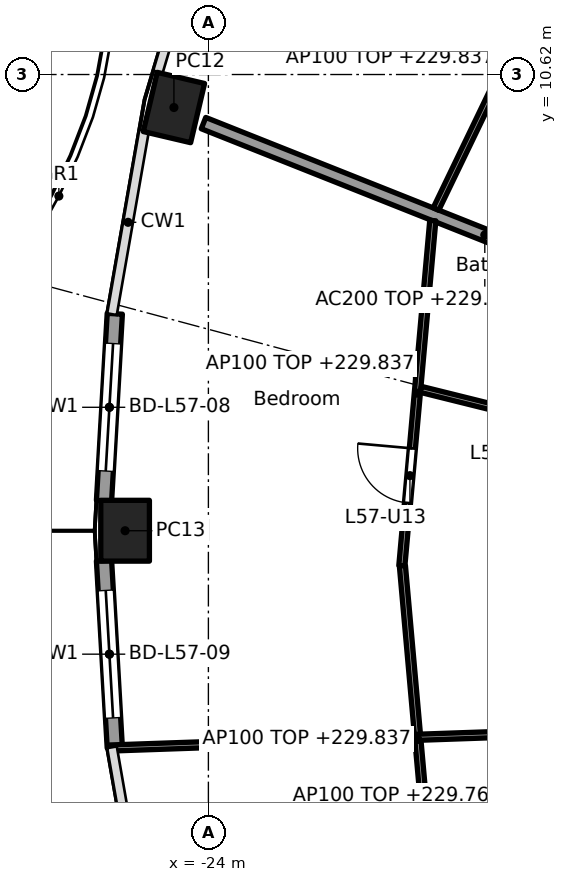
"""IFC4 building model, lengths in metres.
Left out: names, types, materials, properties, quantities, classifications, styles, units other than length and angle.
Written with IfcOpenShell. Run it as: python <this file> out.ifc"""

import sys

from ifc_helpers import new_model, si_unit, direction, frame, frame_2d, origin, origin_2d, place, context, subcontext, project, spatial, rectangle, hollow_rectangle, extrude, element, fill, save


model = new_model("IFC4")
c1 = context("Model", 3, precision=1e-05, world=origin(), true_north=direction((0.0, 1.0)))
c2 = subcontext(c1, "Body", "Model", "MODEL_VIEW")
j1 = project(units=[si_unit("LENGTHUNIT", "METRE"), si_unit("PLANEANGLEUNIT", "RADIAN")], contexts=[c1])
p1 = place(None, origin())
s1 = spatial("IfcSite", under=j1, at=p1, CompositionType="ELEMENT")
p2 = place(p1, origin())
s2 = spatial("IfcBuilding", under=s1, at=p2, CompositionType="ELEMENT")
p3 = place(p2, frame((0.0, 0.0, 227.0)))
s3 = spatial("IfcBuildingStorey", under=s2, at=p3, CompositionType="ELEMENT", Elevation=227.0)
for number, where, z_axis, x_axis in (
    (1, (-24.567, 10.077, 0.0), (0.0, 0.0, 1.0), (-0.229, -0.973, 0.0)),
    (2, (-25.37, 3.118, 0.0), (0.0, 0.0, 1.0), (0.0, -1.0, 0.0)),
):
    element("IfcColumn", number, at=place(p3, frame(where, z_axis=z_axis, x_axis=x_axis)), inside=s3, PredefinedType="COLUMN", context=c2, shape_type="SweptSolid", body=[
        extrude(hollow_rectangle(XDim=1.0, YDim=0.8, WallThickness=0.032, at=origin_2d()), origin(), (0.0, 0.0, 1.0), 3.7),
    ])
p4 = place(p3, frame((-25.717, 3.61, 0.0), z_axis=(0.0, 0.0, 1.0), x_axis=(0.057528189427, 0.998343882348, 0.0)))
e3 = element("IfcWall", 3, at=p4, inside=s3, PredefinedType="SOLIDWALL", context=c2, shape_type="SweptSolid", body=[
    extrude(rectangle(XDim=3.081, YDim=0.25, at=frame_2d((1.541, 0.0))), origin(), (0.0, 0.0, 1.0), 3.44),
])
p5 = place(p4, frame((0.49, 0.0, 0.0)))
e4 = element("IfcOpeningElement", 4, at=p5, cuts=e3, PredefinedType="OPENING", context=c2, shape_type="SweptSolid", body=[
    extrude(rectangle(XDim=2.1, YDim=2.4, at=frame_2d((1.05, 1.2))), frame((0.0, 0.135, 0.0), z_axis=(0.0, -1.0, 0.0), x_axis=(1.0, 0.0, 0.0)), (0.0, 0.0, 1.0), 0.27),
])
p6 = place(p3, frame((-25.539, -0.45, 0.0), z_axis=(0.0, 0.0, 1.0), x_axis=(-0.057528189427, 0.998343882348, 0.0)))
e5 = element("IfcWall", 5, at=p6, inside=s3, PredefinedType="SOLIDWALL", context=c2, shape_type="SweptSolid", body=[
    extrude(rectangle(XDim=3.081, YDim=0.25, at=frame_2d((1.541, 0.0))), origin(), (0.0, 0.0, 1.0), 3.44),
])
p7 = place(p6, frame((0.49, 0.0, 0.0)))
e6 = element("IfcOpeningElement", 6, at=p7, cuts=e5, PredefinedType="OPENING", context=c2, shape_type="SweptSolid", body=[
    extrude(rectangle(XDim=2.1, YDim=2.4, at=frame_2d((1.05, 1.2))), frame((0.0, 0.135, 0.0), z_axis=(0.0, -1.0, 0.0), x_axis=(1.0, 0.0, 0.0)), (0.0, 0.0, 1.0), 0.27),
])
p8 = place(p3, frame((-14.829, 6.141, 0.0), z_axis=(0.0, 0.0, 1.0), x_axis=(-0.929202069098, 0.36957206981, 0.0)))
e7 = element("IfcWall", 7, at=p8, inside=s3, PredefinedType="PARTITIONING", context=c2, shape_type="SweptSolid", body=[
    extrude(rectangle(XDim=9.957, YDim=0.2, at=frame_2d((4.978, 0.0))), origin(), (0.0, 0.0, 1.0), 2.837),
])
p9 = place(p3, frame((-17.861, 13.379, 0.0), z_axis=(0.0, 0.0, 1.0), x_axis=(-0.434302390612, -0.900767136117, 0.0)))
e8 = element("IfcWall", 8, at=p9, inside=s3, PredefinedType="PARTITIONING", context=c2, shape_type="SweptSolid", body=[
    extrude(rectangle(XDim=5.519, YDim=0.1, at=frame_2d((2.759, 0.0))), origin(), (0.0, 0.0, 1.0), 2.837),
])
p10 = place(p9, frame((0.992, 0.0, 0.0)))
e9 = element("IfcOpeningElement", 9, at=p10, cuts=e8, PredefinedType="OPENING", context=c2, shape_type="SweptSolid", body=[
    extrude(rectangle(XDim=0.9, YDim=2.1, at=frame_2d((0.45, 1.05))), frame((0.0, 0.06, 0.0), z_axis=(0.0, -1.0, 0.0), x_axis=(1.0, 0.0, 0.0)), (0.0, 0.0, 1.0), 0.12),
])
p11 = place(p3, frame((-20.31, 8.218, 0.0), z_axis=(0.0, 0.0, 1.0), x_axis=(-0.089284106956, -0.996006198899, 0.0)))
e10 = element("IfcWall", 10, at=p11, inside=s3, PredefinedType="PARTITIONING", context=c2, shape_type="SweptSolid", body=[
    extrude(rectangle(XDim=5.698, YDim=0.1, at=frame_2d((2.849, 0.0))), origin(), (0.0, 0.0, 1.0), 2.837),
])
p12 = place(p11, frame((3.761, 0.0, 0.0)))
e11 = element("IfcOpeningElement", 11, at=p12, cuts=e10, PredefinedType="OPENING", context=c2, shape_type="SweptSolid", body=[
    extrude(rectangle(XDim=0.9, YDim=2.1, at=frame_2d((0.45, 1.05))), frame((0.0, 0.06, 0.0), z_axis=(0.0, -1.0, 0.0), x_axis=(1.0, 0.0, 0.0)), (0.0, 0.0, 1.0), 0.12),
])
p13 = place(p3, frame((-12.662, 3.494, 0.0), z_axis=(0.0, 0.0, 1.0), x_axis=(-0.970505526029, 0.241078874951, 0.0)))
e12 = element("IfcWall", 12, at=p13, inside=s3, PredefinedType="PARTITIONING", context=c2, shape_type="SweptSolid", body=[
    extrude(rectangle(XDim=8.085, YDim=0.1, at=frame_2d((4.043, 0.0))), origin(), (0.0, 0.0, 1.0), 2.762),
])
p14 = place(p13, frame((0.464, 0.0, 0.0)))
e13 = element("IfcOpeningElement", 13, at=p14, cuts=e12, PredefinedType="OPENING", context=c2, shape_type="SweptSolid", body=[
    extrude(rectangle(XDim=0.9, YDim=2.1, at=frame_2d((0.45, 1.05))), frame((0.0, 0.06, 0.0), z_axis=(0.0, -1.0, 0.0), x_axis=(1.0, 0.0, 0.0)), (0.0, 0.0, 1.0), 0.12),
])
p15 = place(p13, frame((5.535, 0.0, 0.0)))
e14 = element("IfcOpeningElement", 14, at=p15, cuts=e12, PredefinedType="OPENING", context=c2, shape_type="SweptSolid", body=[
    extrude(rectangle(XDim=0.9, YDim=2.1, at=frame_2d((0.45, 1.05))), frame((0.0, 0.06, 0.0), z_axis=(0.0, -1.0, 0.0), x_axis=(1.0, 0.0, 0.0)), (0.0, 0.0, 1.0), 0.12),
])
p16 = place(p3, frame((-20.81, 2.542, 0.0), z_axis=(0.0, 0.0, 1.0), x_axis=(0.088651453697, -0.996062708748, 0.0)))
e15 = element("IfcWall", 15, at=p16, inside=s3, PredefinedType="PARTITIONING", context=c2, shape_type="SweptSolid", body=[
    extrude(rectangle(XDim=5.737, YDim=0.1, at=frame_2d((2.868, 0.0))), origin(), (0.0, 0.0, 1.0), 2.837),
])
p17 = place(p3, frame((-12.665, -0.003, 0.0), z_axis=(0.0, 0.0, 1.0), x_axis=(-0.999390583608, -0.034906466382, 0.0)))
e16 = element("IfcWall", 16, at=p17, inside=s3, PredefinedType="PARTITIONING", context=c2, shape_type="SweptSolid", body=[
    extrude(rectangle(XDim=12.967, YDim=0.1, at=frame_2d((6.483, 0.0))), origin(), (0.0, 0.0, 1.0), 2.762),
])
p18 = place(p17, frame((1.435, 0.0, 0.0)))
e17 = element("IfcOpeningElement", 17, at=p18, cuts=e16, PredefinedType="OPENING", context=c2, shape_type="SweptSolid", body=[
    extrude(rectangle(XDim=0.9, YDim=2.1, at=frame_2d((0.45, 1.05))), frame((0.0, 0.06, 0.0), z_axis=(0.0, -1.0, 0.0), x_axis=(1.0, 0.0, 0.0)), (0.0, 0.0, 1.0), 0.12),
])
p19 = place(p17, frame((5.385, 0.0, 0.0)))
e18 = element("IfcOpeningElement", 18, at=p19, cuts=e16, PredefinedType="OPENING", context=c2, shape_type="SweptSolid", body=[
    extrude(rectangle(XDim=0.9, YDim=2.1, at=frame_2d((0.45, 1.05))), frame((0.0, 0.06, 0.0), z_axis=(0.0, -1.0, 0.0), x_axis=(1.0, 0.0, 0.0)), (0.0, 0.0, 1.0), 0.12),
])
p20 = place(p5, origin())
e19 = element("IfcDoor", 19, at=p20, inside=s3, OperationType="SLIDING_TO_LEFT", PredefinedType="DOOR", context=c2, shape_type="SweptSolid", body=[
    extrude(rectangle(XDim=2.1, YDim=2.4, at=frame_2d((1.05, 1.2))), frame((0.0, 0.025, 0.0), z_axis=(0.0, -1.0, 0.0), x_axis=(1.0, 0.0, 0.0)), (0.0, 0.0, 1.0), 0.05),
])
fill(e4, e19)
p21 = place(p7, origin())
e20 = element("IfcDoor", 20, at=p21, inside=s3, OperationType="SLIDING_TO_LEFT", PredefinedType="DOOR", context=c2, shape_type="SweptSolid", body=[
    extrude(rectangle(XDim=2.1, YDim=2.4, at=frame_2d((1.05, 1.2))), frame((0.0, 0.025, 0.0), z_axis=(0.0, -1.0, 0.0), x_axis=(1.0, 0.0, 0.0)), (0.0, 0.0, 1.0), 0.05),
])
fill(e6, e20)
p22 = place(p12, frame((0.9, 0.0, 0.0), x_axis=(-1.0, 0.0, 0.0)))
e21 = element("IfcDoor", 21, at=p22, inside=s3, OperationType="SINGLE_SWING_RIGHT", PredefinedType="DOOR", context=c2, shape_type="SweptSolid", body=[
    extrude(rectangle(XDim=0.9, YDim=2.1, at=frame_2d((0.45, 1.05))), frame((0.0, 0.025, 0.0), z_axis=(0.0, -1.0, 0.0), x_axis=(1.0, 0.0, 0.0)), (0.0, 0.0, 1.0), 0.05),
])
fill(e11, e21)
save(model, sys.argv[1])
